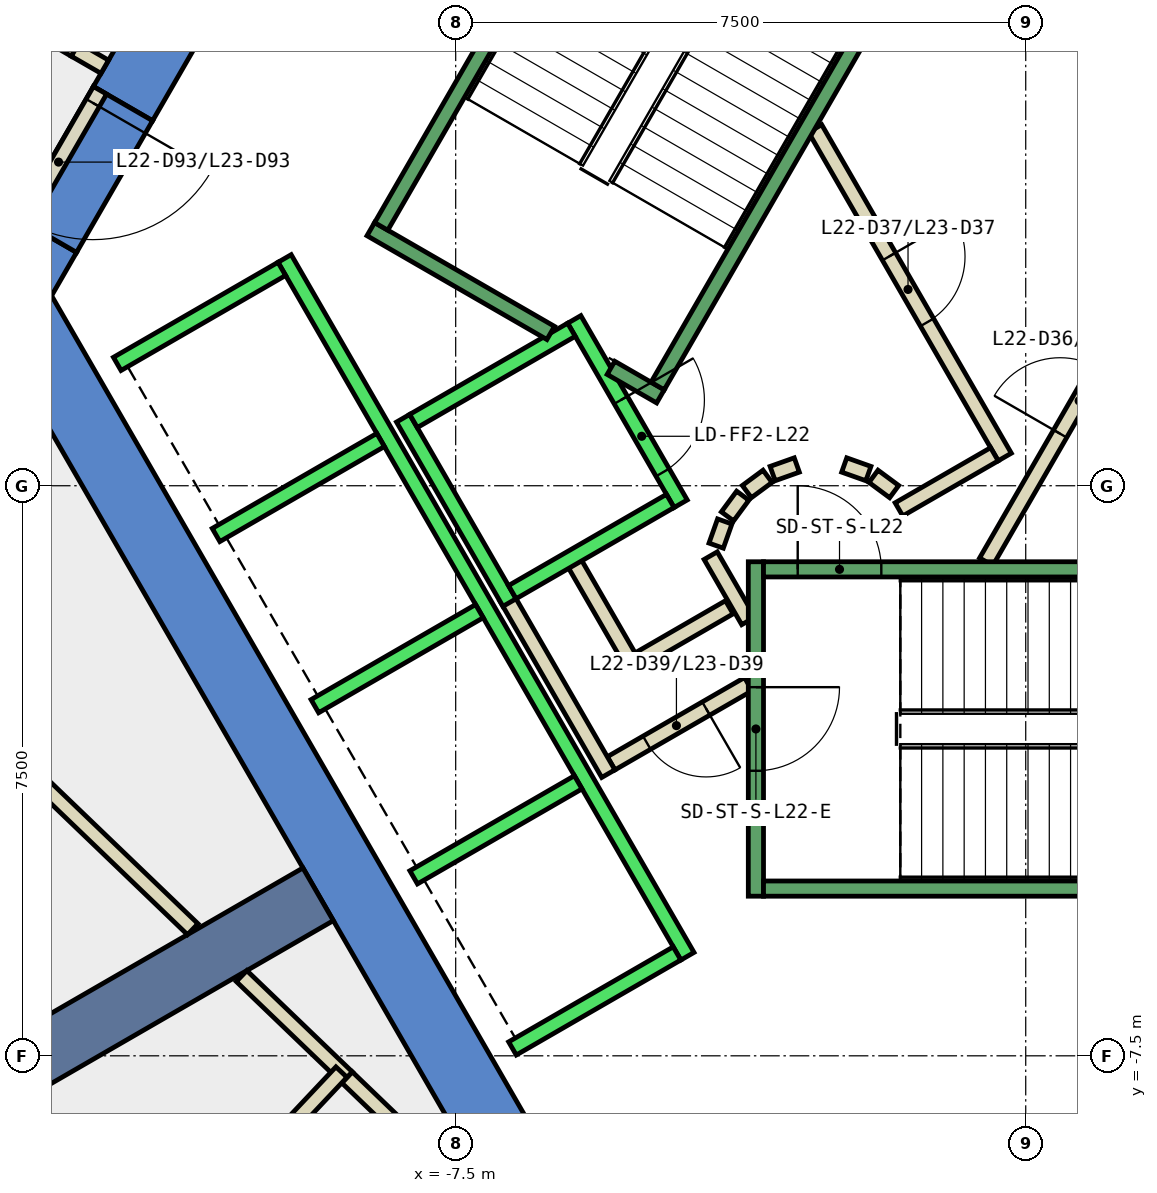
"""IFC4 building model, lengths in metres.
Left out: names, types, materials, properties, quantities, classifications, styles, units other than length and angle.
Written with IfcOpenShell. Run it as: python <this file> out.ifc"""

import sys

from ifc_helpers import new_model, si_unit, direction, frame, frame_2d, origin, place, context, subcontext, project, spatial, polyline, rectangle, outline, extrude, element, fill, save


model = new_model("IFC4")
c1 = context("Model", 3, precision=1e-05, world=origin(), true_north=direction((0.0, 1.0)))
c2 = subcontext(c1, "Body", "Model", "MODEL_VIEW")
j1 = project(units=[si_unit("LENGTHUNIT", "METRE"), si_unit("PLANEANGLEUNIT", "RADIAN")], contexts=[c1])
p1 = place(None, origin())
s1 = spatial("IfcSite", under=j1, at=p1, CompositionType="ELEMENT")
p2 = place(p1, origin())
s2 = spatial("IfcBuilding", under=s1, at=p2, CompositionType="ELEMENT")
p3 = place(p2, frame((0.0, 0.0, 103.4)))
s3 = spatial("IfcBuildingStorey", under=s2, at=p3, CompositionType="ELEMENT", Elevation=103.4)
p4 = place(p3, frame((0.0, 0.0, -0.4)))
e1 = element("IfcWall", 1, at=p4, inside=s3, PredefinedType="SHEAR", context=c2, shape_type="SweptSolid", body=[
    extrude(outline(polyline([(-12.267, 5.252), (-11.488, 4.802), (-6.409, 13.6), (-6.928, 14.5), (-12.267, 5.252)])), origin(), (0.0, 0.0, 1.0), 4.2),
])
p5 = place(p3, frame((0.0, 0.0, -0.4)))
e2 = element("IfcWall", 2, at=p5, inside=s3, PredefinedType="SHEAR", context=c2, shape_type="SweptSolid", body=[
    extrude(outline(polyline([(-12.488, 3.07), (-13.267, 3.52), (-13.856, 2.5), (-12.817, 2.5), (-12.488, 3.07)])), origin(), (0.0, 0.0, 1.0), 4.2),
])
p6 = place(p3, frame((0.0, 0.0, 3.6)))
e3 = element("IfcWall", 3, at=p6, inside=s3, PredefinedType="SHEAR", context=c2, shape_type="SweptSolid", body=[
    extrude(outline(polyline([(-13.267, 3.52), (-12.488, 3.07), (-11.488, 4.802), (-12.267, 5.252), (-13.267, 3.52)])), origin(), (0.0, 0.0, 1.0), 0.2),
])
p7 = place(p3, frame((0.0, 0.0, -0.4)))
e4 = element("IfcWall", 4, at=p7, inside=s3, PredefinedType="SHEAR", context=c2, shape_type="SweptSolid", body=[
    extrude(outline(polyline([(-13.856, 2.5), (-6.928, -9.5), (-6.409, -8.6), (-12.817, 2.5), (-13.856, 2.5)])), origin(), (0.0, 0.0, 1.0), 4.2),
])
p8 = place(p3, frame((-9.31, -5.375, -0.4), z_axis=(0.0, 0.0, 1.0), x_axis=(-0.866017533419, -0.500013631625, 0.0)))
e5 = element("IfcWall", 5, at=p8, inside=s3, PredefinedType="SHEAR", context=c2, shape_type="SweptSolid", body=[
    extrude(rectangle(XDim=9.0, YDim=0.8, at=frame_2d((4.5, 0.0))), origin(), (0.0, 0.0, 1.0), 4.2),
])
p9 = place(p3, frame((-15.835, 7.658, 0.0), z_axis=(0.0, 0.0, 1.0), x_axis=(0.866076614194, -0.499911290476, 0.0)))
e6 = element("IfcWall", 6, at=p9, inside=s3, PredefinedType="PARTITIONING", context=c2, shape_type="SweptSolid", body=[
    extrude(rectangle(XDim=3.843, YDim=0.2, at=frame_2d((1.921, 0.0))), origin(), (0.0, 0.0, 1.0), 3.8),
])
p10 = place(p9, frame((1.646, 0.0, 0.0)))
e7 = element("IfcOpeningElement", 7, at=p10, cuts=e6, PredefinedType="OPENING", context=c2, shape_type="SweptSolid", body=[
    extrude(rectangle(XDim=1.0, YDim=2.1, at=frame_2d((0.5, 1.05))), frame((0.0, 0.11, 0.0), z_axis=(0.0, -1.0, 0.0), x_axis=(1.0, 0.0, 0.0)), (0.0, 0.0, 1.0), 0.22),
])
p11 = place(p3, frame((-3.9, -1.599, 0.0), z_axis=(0.0, 0.0, 1.0), x_axis=(-0.865969445389, -0.500096910261, 0.0)))
e8 = element("IfcWall", 8, at=p11, inside=s3, PredefinedType="PARTITIONING", context=c2, shape_type="SweptSolid", body=[
    extrude(rectangle(XDim=1.373, YDim=0.2, at=frame_2d((0.687, 0.0))), origin(), (0.0, 0.0, 1.0), 3.8),
])
p12 = place(p3, frame((-5.126, -2.422, 0.0), z_axis=(0.0, 0.0, 1.0), x_axis=(-0.500062241894, 0.865989465428, 0.0)))
e9 = element("IfcWall", 9, at=p12, inside=s3, PredefinedType="PARTITIONING", context=c2, shape_type="SweptSolid", body=[
    extrude(rectangle(XDim=1.7, YDim=0.2, at=frame_2d((0.85, 0.0))), origin(), (0.0, 0.0, 1.0), 3.8),
])
p13 = place(p3, frame((-3.65, -2.61, 0.0), z_axis=(0.0, 0.0, 1.0), x_axis=(-0.866072462134, -0.499918483688, 0.0)))
e10 = element("IfcWall", 10, at=p13, inside=s3, PredefinedType="PARTITIONING", context=c2, shape_type="SweptSolid", body=[
    extrude(rectangle(XDim=2.084, YDim=0.2, at=frame_2d((1.042, 0.0))), origin(), (0.0, 0.0, 1.0), 3.8),
])
p14 = place(p13, frame((0.642, 0.0, 0.0)))
e11 = element("IfcOpeningElement", 11, at=p14, cuts=e10, PredefinedType="OPENING", context=c2, shape_type="SweptSolid", body=[
    extrude(rectangle(XDim=0.9, YDim=2.1, at=frame_2d((0.45, 1.05))), frame((0.0, 0.11, 0.0), z_axis=(0.0, -1.0, 0.0), x_axis=(1.0, 0.0, 0.0)), (0.0, 0.0, 1.0), 0.22),
])
p15 = place(p3, frame((-5.492, -3.788, 0.0), z_axis=(0.0, 0.0, 1.0), x_axis=(-0.500008949224, 0.866020236886, 0.0)))
e12 = element("IfcWall", 12, at=p15, inside=s3, PredefinedType="PARTITIONING", context=c2, shape_type="SweptSolid", body=[
    extrude(rectangle(XDim=2.68, YDim=0.2, at=frame_2d((1.34, 0.0))), origin(), (0.0, 0.0, 1.0), 3.8),
])
p16 = place(p3, frame((-4.145, -0.92, 0.0), z_axis=(0.0, 0.0, 1.0), x_axis=(0.499743786207, -0.866173278362, 0.0)))
e13 = element("IfcWall", 13, at=p16, inside=s3, PredefinedType="PARTITIONING", context=c2, shape_type="SweptSolid", body=[
    extrude(rectangle(XDim=0.991, YDim=0.2, at=frame_2d((0.495, 0.0))), origin(), (0.0, 0.0, 1.0), 3.8),
])
p17 = place(p3, frame((-0.52, -1.0, 0.0), z_axis=(0.0, 0.0, 1.0), x_axis=(0.50011622646, 0.865958290007, 0.0)))
e14 = element("IfcWall", 14, at=p17, inside=s3, PredefinedType="PARTITIONING", context=c2, shape_type="SweptSolid", body=[
    extrude(rectangle(XDim=4.991, YDim=0.2, at=frame_2d((2.496, 0.0))), origin(), (0.0, 0.0, 1.0), 3.8),
])
p18 = place(p17, frame((1.945, 0.0, 0.0)))
e15 = element("IfcOpeningElement", 15, at=p18, cuts=e14, PredefinedType="OPENING", context=c2, shape_type="SweptSolid", body=[
    extrude(rectangle(XDim=1.0, YDim=2.1, at=frame_2d((0.5, 1.05))), frame((0.0, 0.11, 0.0), z_axis=(0.0, -1.0, 0.0), x_axis=(1.0, 0.0, 0.0)), (0.0, 0.0, 1.0), 0.22),
])
p19 = place(p3, frame((-2.771, 4.7, 0.0), z_axis=(0.0, 0.0, 1.0), x_axis=(0.499969479948, -0.866043023828, 0.0)))
e16 = element("IfcWall", 16, at=p19, inside=s3, PredefinedType="PARTITIONING", context=c2, shape_type="SweptSolid", body=[
    extrude(rectangle(XDim=4.99, YDim=0.2, at=frame_2d((2.495, 0.0))), origin(), (0.0, 0.0, 1.0), 3.8),
])
p20 = place(p19, frame((1.945, 0.0, 0.0)))
e17 = element("IfcOpeningElement", 17, at=p20, cuts=e16, PredefinedType="OPENING", context=c2, shape_type="SweptSolid", body=[
    extrude(rectangle(XDim=1.0, YDim=2.1, at=frame_2d((0.5, 1.05))), frame((0.0, 0.11, 0.0), z_axis=(0.0, -1.0, 0.0), x_axis=(1.0, 0.0, 0.0)), (0.0, 0.0, 1.0), 0.22),
])
p21 = place(p3, frame((-0.412, 0.414, 0.0), z_axis=(0.0, 0.0, 1.0), x_axis=(-0.866017369001, -0.500013916395, 0.0)))
e18 = element("IfcWall", 18, at=p21, inside=s3, PredefinedType="PARTITIONING", context=c2, shape_type="SweptSolid", body=[
    extrude(rectangle(XDim=1.45, YDim=0.2, at=frame_2d((0.725, 0.0))), origin(), (0.0, 0.0, 1.0), 3.8),
])
p22 = place(p3, frame((-1.731, -0.077, 0.0), z_axis=(0.0, 0.0, 1.0), x_axis=(-0.804311165252, 0.594208338422, 0.0)))
e19 = element("IfcWall", 19, at=p22, inside=s3, PredefinedType="PARTITIONING", context=c2, shape_type="SweptSolid", body=[
    extrude(rectangle(XDim=0.338, YDim=0.2, at=frame_2d((0.169, 0.0))), origin(), (0.0, 0.0, 1.0), 3.8),
])
p23 = place(p3, frame((-2.07, 0.16, 0.0), z_axis=(0.0, 0.0, 1.0), x_axis=(-0.942199461132, 0.335052496547, 0.0)))
e20 = element("IfcWall", 20, at=p23, inside=s3, PredefinedType="PARTITIONING", context=c2, shape_type="SweptSolid", body=[
    extrude(rectangle(XDim=0.337, YDim=0.2, at=frame_2d((0.169, 0.0))), origin(), (0.0, 0.0, 1.0), 3.8),
])
p24 = place(p3, frame((-3.012, 0.273, 0.0), z_axis=(0.0, 0.0, 1.0), x_axis=(-0.942280615813, -0.334824194261, 0.0)))
e21 = element("IfcWall", 21, at=p24, inside=s3, PredefinedType="PARTITIONING", context=c2, shape_type="SweptSolid", body=[
    extrude(rectangle(XDim=0.338, YDim=0.2, at=frame_2d((0.169, 0.0))), origin(), (0.0, 0.0, 1.0), 3.8),
])
p25 = place(p3, frame((-3.397, 0.124, 0.0), z_axis=(0.0, 0.0, 1.0), x_axis=(-0.804311165252, -0.594208338422, 0.0)))
e22 = element("IfcWall", 22, at=p25, inside=s3, PredefinedType="PARTITIONING", context=c2, shape_type="SweptSolid", body=[
    extrude(rectangle(XDim=0.338, YDim=0.2, at=frame_2d((0.169, 0.0))), origin(), (0.0, 0.0, 1.0), 3.8),
])
p26 = place(p3, frame((-3.723, -0.131, 0.0), z_axis=(0.0, 0.0, 1.0), x_axis=(-0.594675113454, -0.803966112121, 0.0)))
e23 = element("IfcWall", 23, at=p26, inside=s3, PredefinedType="PARTITIONING", context=c2, shape_type="SweptSolid", body=[
    extrude(rectangle(XDim=0.338, YDim=0.2, at=frame_2d((0.169, 0.0))), origin(), (0.0, 0.0, 1.0), 3.8),
])
p27 = place(p3, frame((-3.96, -0.47, 0.0), z_axis=(0.0, 0.0, 1.0), x_axis=(-0.334824194261, -0.942280615813, 0.0)))
e24 = element("IfcWall", 24, at=p27, inside=s3, PredefinedType="PARTITIONING", context=c2, shape_type="SweptSolid", body=[
    extrude(rectangle(XDim=0.338, YDim=0.2, at=frame_2d((0.169, 0.0))), origin(), (0.0, 0.0, 1.0), 3.8),
])
p28 = place(p3, frame((-8.93, -7.783, 0.0), z_axis=(0.0, 0.0, 1.0), x_axis=(0.720954255291, -0.692982656189, 0.0)))
e25 = element("IfcWall", 25, at=p28, inside=s3, PredefinedType="PARTITIONING", context=c2, shape_type="SweptSolid", body=[
    extrude(rectangle(XDim=0.89, YDim=0.2, at=frame_2d((0.445, 0.0))), origin(), (0.0, 0.0, 1.0), 3.8),
])
p29 = place(p3, frame((-8.93, -7.783, 0.0), z_axis=(0.0, 0.0, 1.0), x_axis=(-0.72124523191, 0.692679807305, 0.0)))
e26 = element("IfcWall", 26, at=p29, inside=s3, PredefinedType="PARTITIONING", context=c2, shape_type="SweptSolid", body=[
    extrude(rectangle(XDim=1.923, YDim=0.2, at=frame_2d((0.961, 0.0))), origin(), (0.0, 0.0, 1.0), 3.8),
])
p30 = place(p3, frame((-13.865, -12.876, 0.0), z_axis=(0.0, 0.0, 1.0), x_axis=(0.685651384846, 0.727930064263, 0.0)))
e27 = element("IfcWall", 27, at=p30, inside=s3, PredefinedType="PARTITIONING", context=c2, shape_type="SweptSolid", body=[
    extrude(rectangle(XDim=7.091, YDim=0.2, at=frame_2d((3.545, 0.0))), origin(), (0.0, 0.0, 1.0), 3.8),
])
p31 = place(p3, frame((-12.18, 5.202, 0.0), z_axis=(0.0, 0.0, 1.0), x_axis=(-0.50002537861, -0.866010750942, 0.0)))
e28 = element("IfcWall", 28, at=p31, inside=s3, PredefinedType="PARTITIONING", context=c2, shape_type="SweptSolid", body=[
    extrude(rectangle(XDim=2.0, YDim=0.2, at=frame_2d((1.0, 0.0))), origin(), (0.0, 0.0, 1.0), 2.4),
])
p32 = place(p31, frame((0.19, 0.0, 0.0)))
e29 = element("IfcOpeningElement", 29, at=p32, cuts=e28, PredefinedType="OPENING", context=c2, shape_type="SweptSolid", body=[
    extrude(rectangle(XDim=1.8, YDim=2.1, at=frame_2d((0.9, 1.05))), frame((0.0, 0.11, 0.0), z_axis=(0.0, -1.0, 0.0), x_axis=(1.0, 0.0, 0.0)), (0.0, 0.0, 1.0), 0.22),
])
p33 = place(p3, frame((-10.96, -5.834, 0.0), z_axis=(0.0, 0.0, 1.0), x_axis=(-0.721236335428, 0.692689070549, 0.0)))
e30 = element("IfcWall", 30, at=p33, inside=s3, PredefinedType="PARTITIONING", context=c2, shape_type="SweptSolid", body=[
    extrude(rectangle(XDim=11.246, YDim=0.2, at=frame_2d((5.623, 0.0))), origin(), (0.0, 0.0, 1.0), 3.8),
])
p34 = place(p3, frame((-12.507, 5.737, 0.0), z_axis=(0.0, 0.0, 1.0), x_axis=(0.866167537795, -0.499753735824, 0.0)))
e31 = element("IfcWall", 31, at=p34, inside=s3, PredefinedType="PARTITIONING", context=c2, shape_type="SweptSolid", body=[
    extrude(rectangle(XDim=0.45, YDim=0.2, at=frame_2d((0.225, 0.0))), origin(), (0.0, 0.0, 1.0), 2.4),
])
p35 = place(p3, frame((-5.94, 2.188, 0.0), z_axis=(0.0, 0.0, 1.0), x_axis=(0.49994636267, -0.866056369097, 0.0)))
e32 = element("IfcWall", 32, at=p35, inside=s3, PredefinedType="STANDARD", context=c2, shape_type="SweptSolid", body=[
    extrude(rectangle(XDim=2.8, YDim=0.2, at=frame_2d((1.4, 0.0))), origin(), (0.0, 0.0, 1.0), 3.8),
])
p36 = place(p35, frame((1.225, 0.0, 0.0)))
e33 = element("IfcOpeningElement", 33, at=p36, cuts=e32, PredefinedType="OPENING", context=c2, shape_type="SweptSolid", body=[
    extrude(rectangle(XDim=1.1, YDim=2.1, at=frame_2d((0.55, 1.05))), frame((0.0, 0.11, 0.0), z_axis=(0.0, -1.0, 0.0), x_axis=(1.0, 0.0, 0.0)), (0.0, 0.0, 1.0), 0.22),
])
p37 = place(p3, frame((-8.192, 0.888, 0.0), z_axis=(0.0, 0.0, 1.0), x_axis=(0.49994636267, -0.866056369097, 0.0)))
e34 = element("IfcWall", 34, at=p37, inside=s3, PredefinedType="STANDARD", context=c2, shape_type="SweptSolid", body=[
    extrude(rectangle(XDim=2.8, YDim=0.2, at=frame_2d((1.4, 0.0))), origin(), (0.0, 0.0, 1.0), 3.8),
])
for number, where, z_axis, x_axis in (
    (35, (-5.977, 2.052, 0.0), (0.0, 0.0, 1.0), (-0.866, -0.5, 0.0)),
    (36, (-4.677, -0.2, 0.0), (0.0, 0.0, 1.0), (-0.866, -0.5, 0.0)),
):
    element("IfcWall", number, at=place(p3, frame(where, z_axis=z_axis, x_axis=x_axis)), inside=s3, PredefinedType="STANDARD", context=c2, shape_type="SweptSolid", body=[
        extrude(rectangle(XDim=2.399, YDim=0.2, at=frame_2d((1.2, 0.0))), origin(), (0.0, 0.0, 1.0), 3.8),
    ])
p38 = place(p3, frame((-9.751, 2.99, 0.0), z_axis=(0.0, 0.0, 1.0), x_axis=(0.50000090737, -0.866024879913, 0.0)))
e37 = element("IfcWall", 37, at=p38, inside=s3, PredefinedType="STANDARD", context=c2, shape_type="SweptSolid", body=[
    extrude(rectangle(XDim=10.6, YDim=0.2, at=frame_2d((5.3, 0.0))), origin(), (0.0, 0.0, 1.0), 3.8),
])
p39 = place(p3, frame((-9.788, 2.853, 0.0), z_axis=(0.0, 0.0, 1.0), x_axis=(-0.865998541277, -0.500046524342, 0.0)))
e38 = element("IfcWall", 38, at=p39, inside=s3, PredefinedType="STANDARD", context=c2, shape_type="SweptSolid", body=[
    extrude(rectangle(XDim=2.5, YDim=0.2, at=frame_2d((1.25, 0.0))), origin(), (0.0, 0.0, 1.0), 3.8),
])
for number, where, z_axis, x_axis in (
    (39, (-8.488, 0.602, 0.0), (0.0, 0.0, 1.0), (-0.866, -0.5, 0.0)),
    (40, (-7.188, -1.65, 0.0), (0.0, 0.0, 1.0), (-0.866, -0.5, 0.0)),
    (41, (-5.888, -3.902, 0.0), (0.0, 0.0, 1.0), (-0.866, -0.5, 0.0)),
    (42, (-4.588, -6.153, 0.0), (0.0, 0.0, 1.0), (-0.866, -0.5, 0.0)),
):
    element("IfcWall", number, at=place(p3, frame(where, z_axis=z_axis, x_axis=x_axis)), inside=s3, PredefinedType="STANDARD", context=c2, shape_type="SweptSolid", body=[
        extrude(rectangle(XDim=2.5, YDim=0.2, at=frame_2d((1.25, 0.0))), origin(), (0.0, 0.0, 1.0), 3.8),
    ])
p40 = place(p3, frame((-3.55, -1.0, 0.0), z_axis=(0.0, 0.0, 1.0), x_axis=(0.0, -1.0, 0.0)))
e43 = element("IfcWall", 43, at=p40, inside=s3, PredefinedType="STANDARD", context=c2, shape_type="SweptSolid", body=[
    extrude(rectangle(XDim=4.4, YDim=0.2, at=frame_2d((2.2, 0.0))), origin(), (0.0, 0.0, 1.0), 3.8),
])
p41 = place(p40, frame((1.65, 0.0, 0.0)))
e44 = element("IfcOpeningElement", 44, at=p41, cuts=e43, PredefinedType="OPENING", context=c2, shape_type="SweptSolid", body=[
    extrude(rectangle(XDim=1.1, YDim=2.2, at=frame_2d((0.55, 1.1))), frame((0.0, 0.11, 0.0), z_axis=(0.0, -1.0, 0.0), x_axis=(1.0, 0.0, 0.0)), (0.0, 0.0, 1.0), 0.22),
])
p42 = place(p3, frame((-3.45, -1.1, 0.0), z_axis=(0.0, 0.0, 1.0), x_axis=(1.0, 0.0, 0.0)))
e45 = element("IfcWall", 45, at=p42, inside=s3, PredefinedType="STANDARD", context=c2, shape_type="SweptSolid", body=[
    extrude(rectangle(XDim=6.9, YDim=0.2, at=frame_2d((3.45, 0.0))), origin(), (0.0, 0.0, 1.0), 3.8),
])
p43 = place(p42, frame((0.45, 0.0, 0.0)))
e46 = element("IfcOpeningElement", 46, at=p43, cuts=e45, PredefinedType="OPENING", context=c2, shape_type="SweptSolid", body=[
    extrude(rectangle(XDim=1.1, YDim=2.2, at=frame_2d((0.55, 1.1))), frame((0.0, 0.11, 0.0), z_axis=(0.0, -1.0, 0.0), x_axis=(1.0, 0.0, 0.0)), (0.0, 0.0, 1.0), 0.22),
])
p44 = place(p3, frame((-3.45, -5.3, 0.0), z_axis=(0.0, 0.0, 1.0), x_axis=(1.0, 0.0, 0.0)))
e47 = element("IfcWall", 47, at=p44, inside=s3, PredefinedType="STANDARD", context=c2, shape_type="SweptSolid", body=[
    extrude(rectangle(XDim=6.9, YDim=0.2, at=frame_2d((3.45, 0.0))), origin(), (0.0, 0.0, 1.0), 3.8),
])
p45 = place(p3, frame((-6.25, 2.01, 0.0), z_axis=(0.0, 0.0, 1.0), x_axis=(-0.86611865017, 0.499838457731, 0.0)))
e48 = element("IfcWall", 48, at=p45, inside=s3, PredefinedType="STANDARD", context=c2, shape_type="SweptSolid", body=[
    extrude(rectangle(XDim=2.733, YDim=0.2, at=frame_2d((1.366, 0.0))), origin(), (0.0, 0.0, 1.0), 3.8),
])
p46 = place(p3, frame((-4.806, 1.176, 0.0), z_axis=(0.0, 0.0, 1.0), x_axis=(-0.866558586415, 0.499075361355, 0.0)))
e49 = element("IfcWall", 49, at=p46, inside=s3, PredefinedType="STANDARD", context=c2, shape_type="SweptSolid", body=[
    extrude(rectangle(XDim=0.751, YDim=0.2, at=frame_2d((0.376, 0.0))), origin(), (0.0, 0.0, 1.0), 3.8),
])
p47 = place(p3, frame((-1.393, 7.288, 0.0), z_axis=(0.0, 0.0, 1.0), x_axis=(-0.499963383562, -0.866046543262, 0.0)))
e50 = element("IfcWall", 50, at=p47, inside=s3, PredefinedType="STANDARD", context=c2, shape_type="SweptSolid", body=[
    extrude(rectangle(XDim=6.9, YDim=0.2, at=frame_2d((3.45, 0.0))), origin(), (0.0, 0.0, 1.0), 3.8),
])
p48 = place(p47, frame((0.45, 0.0, 0.0)))
e51 = element("IfcOpeningElement", 51, at=p48, cuts=e50, PredefinedType="OPENING", context=c2, shape_type="SweptSolid", body=[
    extrude(rectangle(XDim=1.1, YDim=2.2, at=frame_2d((0.55, 1.1))), frame((0.0, 0.11, 0.0), z_axis=(0.0, -1.0, 0.0), x_axis=(1.0, 0.0, 0.0)), (0.0, 0.0, 1.0), 0.22),
])
p49 = place(p3, frame((-5.03, 9.388, 0.0), z_axis=(0.0, 0.0, 1.0), x_axis=(-0.499978703459, -0.866037698999, 0.0)))
e52 = element("IfcWall", 52, at=p49, inside=s3, PredefinedType="STANDARD", context=c2, shape_type="SweptSolid", body=[
    extrude(rectangle(XDim=6.9, YDim=0.2, at=frame_2d((3.45, 0.0))), origin(), (0.0, 0.0, 1.0), 3.8),
])
p50 = place(p18, origin())
e53 = element("IfcDoor", 53, at=p50, inside=s3, OperationType="SINGLE_SWING_LEFT", PredefinedType="DOOR", context=c2, shape_type="SweptSolid", body=[
    extrude(rectangle(XDim=1.0, YDim=2.1, at=frame_2d((0.5, 1.05))), frame((0.0, 0.025, 0.0), z_axis=(0.0, -1.0, 0.0), x_axis=(1.0, 0.0, 0.0)), (0.0, 0.0, 1.0), 0.05),
])
fill(e15, e53)
p51 = place(p20, origin())
e54 = element("IfcDoor", 54, at=p51, inside=s3, OperationType="SINGLE_SWING_RIGHT", PredefinedType="DOOR", context=c2, shape_type="SweptSolid", body=[
    extrude(rectangle(XDim=1.0, YDim=2.1, at=frame_2d((0.5, 1.05))), frame((0.0, 0.025, 0.0), z_axis=(0.0, -1.0, 0.0), x_axis=(1.0, 0.0, 0.0)), (0.0, 0.0, 1.0), 0.05),
])
fill(e17, e54)
p52 = place(p14, origin())
e55 = element("IfcDoor", 55, at=p52, inside=s3, OperationType="SINGLE_SWING_LEFT", PredefinedType="DOOR", context=c2, shape_type="SweptSolid", body=[
    extrude(rectangle(XDim=0.9, YDim=2.1, at=frame_2d((0.45, 1.05))), frame((0.0, 0.025, 0.0), z_axis=(0.0, -1.0, 0.0), x_axis=(1.0, 0.0, 0.0)), (0.0, 0.0, 1.0), 0.05),
])
fill(e11, e55)
p53 = place(p32, origin())
e56 = element("IfcDoor", 56, at=p53, inside=s3, OperationType="DOUBLE_DOOR_SINGLE_SWING", PredefinedType="DOOR", context=c2, shape_type="SweptSolid", body=[
    extrude(rectangle(XDim=1.8, YDim=2.1, at=frame_2d((0.9, 1.05))), frame((0.0, 0.025, 0.0), z_axis=(0.0, -1.0, 0.0), x_axis=(1.0, 0.0, 0.0)), (0.0, 0.0, 1.0), 0.05),
])
fill(e29, e56)
p54 = place(p36, origin())
e57 = element("IfcDoor", 57, at=p54, inside=s3, OperationType="SLIDING_TO_LEFT", PredefinedType="DOOR", context=c2, shape_type="SweptSolid", body=[
    extrude(rectangle(XDim=1.1, YDim=2.1, at=frame_2d((0.55, 1.05))), frame((0.0, 0.025, 0.0), z_axis=(0.0, -1.0, 0.0), x_axis=(1.0, 0.0, 0.0)), (0.0, 0.0, 1.0), 0.05),
])
fill(e33, e57)
p55 = place(p43, origin())
e58 = element("IfcDoor", 58, at=p55, inside=s3, OperationType="SINGLE_SWING_LEFT", PredefinedType="DOOR", context=c2, shape_type="SweptSolid", body=[
    extrude(rectangle(XDim=1.1, YDim=2.2, at=frame_2d((0.55, 1.1))), frame((0.0, 0.025, 0.0), z_axis=(0.0, -1.0, 0.0), x_axis=(1.0, 0.0, 0.0)), (0.0, 0.0, 1.0), 0.05),
])
fill(e46, e58)
p56 = place(p41, origin())
e59 = element("IfcDoor", 59, at=p56, inside=s3, OperationType="SINGLE_SWING_LEFT", PredefinedType="DOOR", context=c2, shape_type="SweptSolid", body=[
    extrude(rectangle(XDim=1.1, YDim=2.2, at=frame_2d((0.55, 1.1))), frame((0.0, 0.025, 0.0), z_axis=(0.0, -1.0, 0.0), x_axis=(1.0, 0.0, 0.0)), (0.0, 0.0, 1.0), 0.05),
])
fill(e44, e59)
save(model, sys.argv[1])
